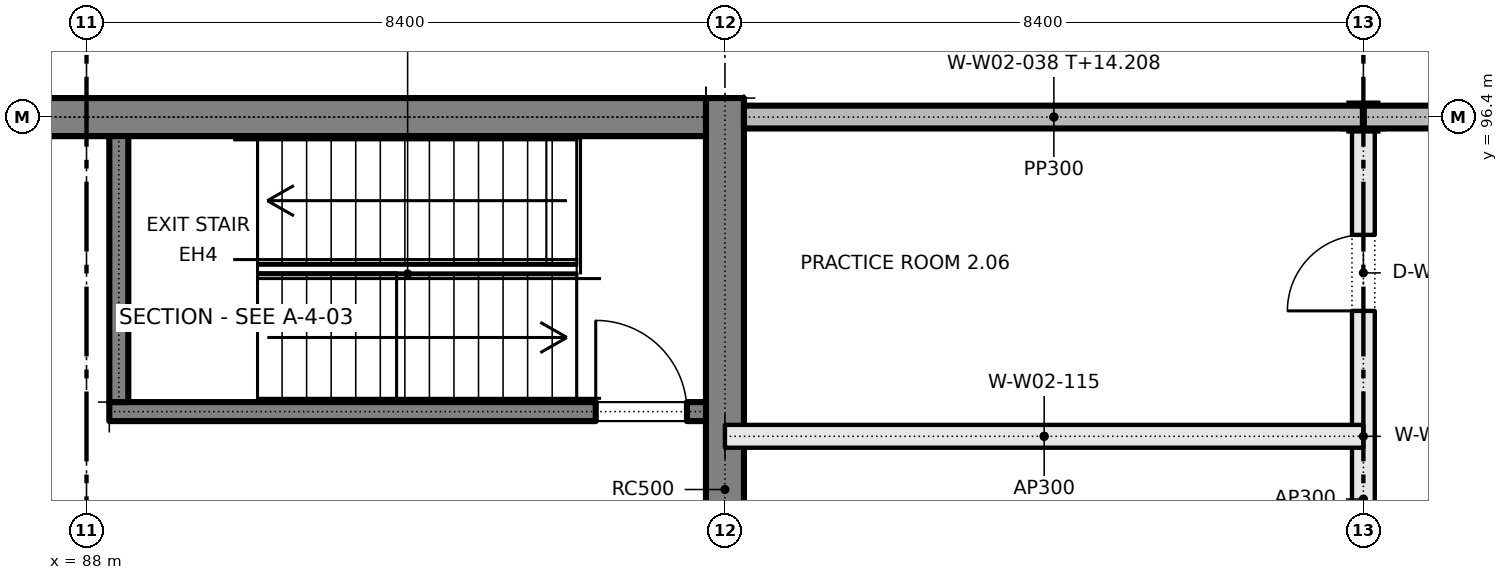
"""IFC4 building model, lengths in metres.
Left out: names, types, materials, properties, quantities, classifications, styles, units other than length and angle.
Written with IfcOpenShell. Run it as: python <this file> out.ifc"""

import sys

from ifc_helpers import new_model, si_unit, direction, frame, frame_2d, origin, origin_2d, place, context, subcontext, project, spatial, rectangle, i_section, extrude, element, fill, save


model = new_model("IFC4")
c1 = context("Model", 3, precision=1e-05, world=origin(), true_north=direction((0.0, 1.0)))
c2 = subcontext(c1, "Body", "Model", "MODEL_VIEW")
j1 = project(units=[si_unit("LENGTHUNIT", "METRE"), si_unit("PLANEANGLEUNIT", "RADIAN")], contexts=[c1])
p1 = place(None, origin())
s1 = spatial("IfcSite", under=j1, at=p1, CompositionType="ELEMENT")
p2 = place(p1, origin())
s2 = spatial("IfcBuilding", under=s1, at=p2, CompositionType="ELEMENT")
p3 = place(p2, frame((0.0, 0.0, 10.2)))
s3 = spatial("IfcBuildingStorey", under=s2, at=p3, CompositionType="ELEMENT", Elevation=10.2)
p4 = place(p3, frame((96.4, 54.15, 0.0), z_axis=(0.0, 0.0, 1.0), x_axis=(0.0, 1.0, 0.0)))
e1 = element("IfcWall", 1, at=p4, inside=s3, PredefinedType="SOLIDWALL", context=c2, shape_type="SweptSolid", body=[
    extrude(rectangle(XDim=42.5, YDim=0.5, at=frame_2d((21.25, 0.0))), origin(), (0.0, 0.0, 1.0), 4.8),
])
p5 = place(p3, frame((85.9, 96.4, 0.0), z_axis=(0.0, 0.0, 1.0), x_axis=(1.0, 0.0, 0.0)))
e2 = element("IfcWall", 2, at=p5, inside=s3, PredefinedType="SOLIDWALL", context=c2, shape_type="SweptSolid", body=[
    extrude(rectangle(XDim=10.25, YDim=0.5, at=frame_2d((5.125, 0.0))), origin(), (0.0, 0.0, 1.0), 3.5),
])
p6 = place(p3, frame((29.45, 96.4, 3.5), z_axis=(0.0, 0.0, 1.0), x_axis=(1.0, 0.0, 0.0)))
e3 = element("IfcWall", 3, at=p6, inside=s3, PredefinedType="SOLIDWALL", context=c2, shape_type="SweptSolid", body=[
    extrude(rectangle(XDim=66.7, YDim=0.5, at=frame_2d((33.35, 0.0))), origin(), (0.0, 0.0, 1.0), 1.3),
])
p7 = place(p3, frame((88.3, 92.525, 0.0), z_axis=(0.0, 0.0, 1.0), x_axis=(1.0, 0.0, 0.0)))
e4 = element("IfcWall", 4, at=p7, inside=s3, PredefinedType="SOLIDWALL", context=c2, shape_type="SweptSolid", body=[
    extrude(rectangle(XDim=7.85, YDim=0.25, at=frame_2d((3.925, 0.0))), origin(), (0.0, 0.0, 1.0), 4.8),
])
p8 = place(p7, frame((6.4, 0.0, 0.0)))
e5 = element("IfcOpeningElement", 5, at=p8, cuts=e4, PredefinedType="OPENING", context=c2, shape_type="SweptSolid", body=[
    extrude(rectangle(XDim=1.2, YDim=2.1, at=frame_2d((0.6, 1.05))), frame((0.0, 0.135, 0.0), z_axis=(0.0, -1.0, 0.0), x_axis=(1.0, 0.0, 0.0)), (0.0, 0.0, 1.0), 0.27),
])
p9 = place(p3, frame((88.425, 92.65, 0.0), z_axis=(0.0, 0.0, 1.0), x_axis=(0.0, 1.0, 0.0)))
e6 = element("IfcWall", 6, at=p9, inside=s3, PredefinedType="SOLIDWALL", context=c2, shape_type="SweptSolid", body=[
    extrude(rectangle(XDim=3.5, YDim=0.25, at=frame_2d((1.75, 0.0))), origin(), (0.0, 0.0, 1.0), 4.8),
])
p10 = place(p3, frame((104.8, 96.4, 0.0), z_axis=(0.0, 0.0, 1.0), x_axis=(1.0, 0.0, 0.0)))
e7 = element("IfcColumn", 7, at=p10, inside=s3, PredefinedType="COLUMN", context=c2, shape_type="SweptSolid", body=[
    extrude(i_section(OverallWidth=0.368, OverallDepth=0.356, WebThickness=0.011, FlangeThickness=0.018, FilletRadius=0.015, at=origin_2d()), origin(), (0.0, 0.0, 1.0), 4.8),
])
p11 = place(p3, frame((96.65, 96.4, 0.0), z_axis=(0.0, 0.0, 1.0), x_axis=(1.0, 0.0, 0.0)))
e8 = element("IfcWall", 8, at=p11, inside=s3, PredefinedType="SOLIDWALL", context=c2, shape_type="SweptSolid", body=[
    extrude(rectangle(XDim=8.156, YDim=0.3, at=frame_2d((4.078, 0.0))), origin(), (0.0, 0.0, 1.0), 4.008),
])
p12 = place(p3, frame((104.794, 96.4, 0.0), z_axis=(0.0, 0.0, 1.0), x_axis=(1.0, 0.0, 0.0)))
e9 = element("IfcWall", 9, at=p12, inside=s3, PredefinedType="SOLIDWALL", context=c2, shape_type="SweptSolid", body=[
    extrude(rectangle(XDim=8.4, YDim=0.3, at=frame_2d((4.2, 0.0))), origin(), (0.0, 0.0, 1.0), 4.008),
])
p13 = place(p3, frame((104.8, 88.178, 0.0), z_axis=(0.0, 0.0, 1.0), x_axis=(0.0, 1.0, 0.0)))
e10 = element("IfcWall", 10, at=p13, inside=s3, PredefinedType="PARTITIONING", context=c2, shape_type="SweptSolid", body=[
    extrude(rectangle(XDim=8.044, YDim=0.3, at=frame_2d((4.022, 0.0))), origin(), (0.0, 0.0, 1.0), 4.087),
])
p14 = place(p13, frame((1.372, 0.0, 0.0)))
e11 = element("IfcOpeningElement", 11, at=p14, cuts=e10, PredefinedType="OPENING", context=c2, shape_type="SweptSolid", body=[
    extrude(rectangle(XDim=1.0, YDim=2.1, at=frame_2d((0.5, 1.05))), frame((0.0, 0.16, 0.0), z_axis=(0.0, -1.0, 0.0), x_axis=(1.0, 0.0, 0.0)), (0.0, 0.0, 1.0), 0.32),
])
p15 = place(p13, frame((5.672, 0.0, 0.0)))
e12 = element("IfcOpeningElement", 12, at=p15, cuts=e10, PredefinedType="OPENING", context=c2, shape_type="SweptSolid", body=[
    extrude(rectangle(XDim=1.0, YDim=2.1, at=frame_2d((0.5, 1.05))), frame((0.0, 0.16, 0.0), z_axis=(0.0, -1.0, 0.0), x_axis=(1.0, 0.0, 0.0)), (0.0, 0.0, 1.0), 0.32),
])
p16 = place(p3, frame((96.4, 92.2, 0.0), z_axis=(0.0, 0.0, 1.0), x_axis=(1.0, 0.0, 0.0)))
e13 = element("IfcWall", 13, at=p16, inside=s3, PredefinedType="PARTITIONING", context=c2, shape_type="SweptSolid", body=[
    extrude(rectangle(XDim=8.4, YDim=0.3, at=frame_2d((4.2, 0.0))), origin(), (0.0, 0.0, 1.0), 4.8),
])
p17 = place(p8, origin())
e14 = element("IfcDoor", 14, at=p17, inside=s3, OperationType="SINGLE_SWING_LEFT", PredefinedType="DOOR", context=c2, shape_type="SweptSolid", body=[
    extrude(rectangle(XDim=1.2, YDim=2.1, at=frame_2d((0.6, 1.05))), frame((0.0, 0.025, 0.0), z_axis=(0.0, -1.0, 0.0), x_axis=(1.0, 0.0, 0.0)), (0.0, 0.0, 1.0), 0.05),
])
fill(e5, e14)
p18 = place(p15, origin())
e15 = element("IfcDoor", 15, at=p18, inside=s3, OperationType="SINGLE_SWING_LEFT", PredefinedType="DOOR", context=c2, shape_type="SweptSolid", body=[
    extrude(rectangle(XDim=1.0, YDim=2.1, at=frame_2d((0.5, 1.05))), frame((0.0, 0.025, 0.0), z_axis=(0.0, -1.0, 0.0), x_axis=(1.0, 0.0, 0.0)), (0.0, 0.0, 1.0), 0.05),
])
fill(e12, e15)
save(model, sys.argv[1])
